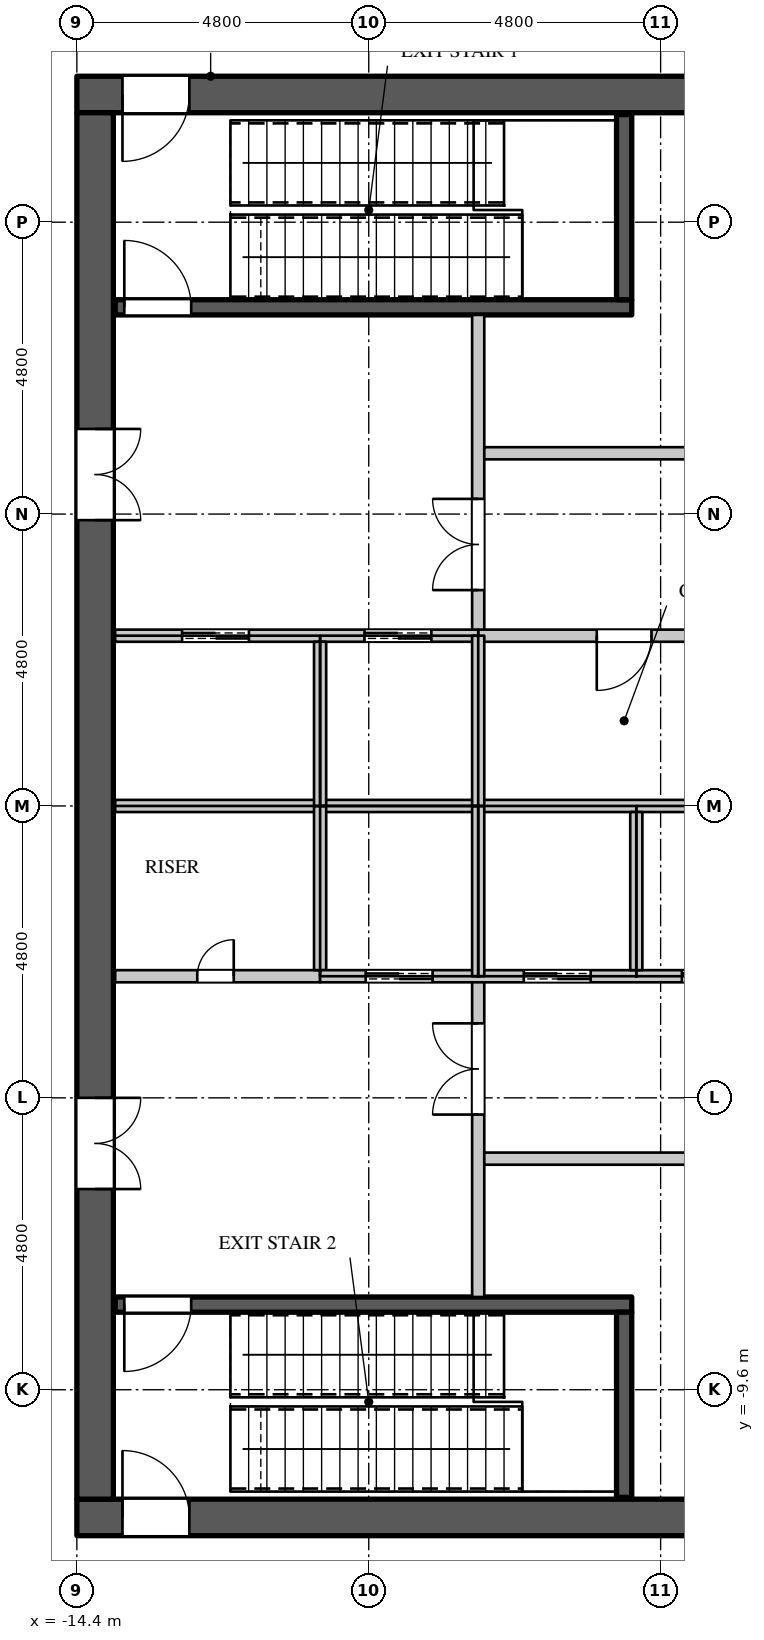
"""IFC4 building model, lengths in metres.
Left out: names, types, materials, properties, quantities, classifications, styles, units other than length and angle.
Written with IfcOpenShell. Run it as: python <this file> out.ifc"""

import sys

from ifc_helpers import new_model, si_unit, direction, frame, frame_2d, origin, place, context, subcontext, project, spatial, rectangle, extrude, element, fill, save


model = new_model("IFC4")
c1 = context("Model", 3, precision=1e-05, world=origin(), true_north=direction((0.0, 1.0)))
c2 = subcontext(c1, "Body", "Model", "MODEL_VIEW")
j1 = project(units=[si_unit("LENGTHUNIT", "METRE"), si_unit("PLANEANGLEUNIT", "RADIAN")], contexts=[c1])
p1 = place(None, origin())
s1 = spatial("IfcSite", under=j1, at=p1, CompositionType="ELEMENT")
p2 = place(p1, origin())
s2 = spatial("IfcBuilding", under=s1, at=p2, CompositionType="ELEMENT")
p3 = place(p2, frame((0.0, 0.0, 314.7)))
s3 = spatial("IfcBuildingStorey", under=s2, at=p3, CompositionType="ELEMENT", Elevation=314.7)
p4 = place(p3, frame((-14.4, 11.7, 0.0), z_axis=(0.0, 0.0, 1.0), x_axis=(1.0, 0.0, 0.0)))
e1 = element("IfcWall", 1, at=p4, inside=s3, PredefinedType="SHEAR", context=c2, shape_type="SweptSolid", body=[
    extrude(rectangle(XDim=28.8, YDim=0.6, at=frame_2d((14.4, 0.0))), origin(), (0.0, 0.0, 1.0), 5.4),
])
p5 = place(p4, frame((0.75, 0.0, 0.0)))
e2 = element("IfcOpeningElement", 2, at=p5, cuts=e1, PredefinedType="OPENING", context=c2, shape_type="SweptSolid", body=[
    extrude(rectangle(XDim=1.1, YDim=2.2, at=frame_2d((0.55, 1.1))), frame((0.0, 0.31, 0.0), z_axis=(0.0, -1.0, 0.0), x_axis=(1.0, 0.0, 0.0)), (0.0, 0.0, 1.0), 0.62),
])
p6 = place(p4, frame((26.95, 0.0, 0.0)))
e3 = element("IfcOpeningElement", 3, at=p6, cuts=e1, PredefinedType="OPENING", context=c2, shape_type="SweptSolid", body=[
    extrude(rectangle(XDim=1.1, YDim=2.2, at=frame_2d((0.55, 1.1))), frame((0.0, 0.31, 0.0), z_axis=(0.0, -1.0, 0.0), x_axis=(1.0, 0.0, 0.0)), (0.0, 0.0, 1.0), 0.62),
])
p7 = place(p3, frame((-14.4, -11.7, 0.0), z_axis=(0.0, 0.0, 1.0), x_axis=(1.0, 0.0, 0.0)))
e4 = element("IfcWall", 4, at=p7, inside=s3, PredefinedType="SHEAR", context=c2, shape_type="SweptSolid", body=[
    extrude(rectangle(XDim=28.8, YDim=0.6, at=frame_2d((14.4, 0.0))), origin(), (0.0, 0.0, 1.0), 5.4),
])
p8 = place(p7, frame((0.75, 0.0, 0.0)))
e5 = element("IfcOpeningElement", 5, at=p8, cuts=e4, PredefinedType="OPENING", context=c2, shape_type="SweptSolid", body=[
    extrude(rectangle(XDim=1.1, YDim=2.2, at=frame_2d((0.55, 1.1))), frame((0.0, 0.31, 0.0), z_axis=(0.0, -1.0, 0.0), x_axis=(1.0, 0.0, 0.0)), (0.0, 0.0, 1.0), 0.62),
])
p9 = place(p7, frame((26.95, 0.0, 0.0)))
e6 = element("IfcOpeningElement", 6, at=p9, cuts=e4, PredefinedType="OPENING", context=c2, shape_type="SweptSolid", body=[
    extrude(rectangle(XDim=1.1, YDim=2.2, at=frame_2d((0.55, 1.1))), frame((0.0, 0.31, 0.0), z_axis=(0.0, -1.0, 0.0), x_axis=(1.0, 0.0, 0.0)), (0.0, 0.0, 1.0), 0.62),
])
p10 = place(p3, frame((-14.1, -11.4, 0.0), z_axis=(0.0, 0.0, 1.0), x_axis=(0.0, 1.0, 0.0)))
e7 = element("IfcWall", 7, at=p10, inside=s3, PredefinedType="SHEAR", context=c2, shape_type="SweptSolid", body=[
    extrude(rectangle(XDim=22.8, YDim=0.6, at=frame_2d((11.4, 0.0))), origin(), (0.0, 0.0, 1.0), 5.4),
])
p11 = place(p10, frame((16.1, 0.0, 0.0)))
e8 = element("IfcOpeningElement", 8, at=p11, cuts=e7, PredefinedType="OPENING", context=c2, shape_type="SweptSolid", body=[
    extrude(rectangle(XDim=1.5, YDim=2.4, at=frame_2d((0.75, 1.2))), frame((0.0, 0.31, 0.0), z_axis=(0.0, -1.0, 0.0), x_axis=(1.0, 0.0, 0.0)), (0.0, 0.0, 1.0), 0.62),
])
p12 = place(p10, frame((5.1, 0.0, 0.0)))
e9 = element("IfcOpeningElement", 9, at=p12, cuts=e7, PredefinedType="OPENING", context=c2, shape_type="SweptSolid", body=[
    extrude(rectangle(XDim=1.5, YDim=2.4, at=frame_2d((0.75, 1.2))), frame((0.0, 0.31, 0.0), z_axis=(0.0, -1.0, 0.0), x_axis=(1.0, 0.0, 0.0)), (0.0, 0.0, 1.0), 0.62),
])
p13 = place(p3, frame((-7.8, -8.075, 0.0), z_axis=(0.0, 0.0, 1.0), x_axis=(0.0, 1.0, 0.0)))
e10 = element("IfcWall", 10, at=p13, inside=s3, PredefinedType="PARTITIONING", context=c2, shape_type="SweptSolid", body=[
    extrude(rectangle(XDim=5.275, YDim=0.2, at=frame_2d((2.637, 0.0))), origin(), (0.0, 0.0, 1.0), 5.1),
])
p14 = place(p13, frame((3.0, 0.0, 0.0)))
e11 = element("IfcOpeningElement", 11, at=p14, cuts=e10, PredefinedType="OPENING", context=c2, shape_type="SweptSolid", body=[
    extrude(rectangle(XDim=1.5, YDim=2.4, at=frame_2d((0.75, 1.2))), frame((0.0, 0.11, 0.0), z_axis=(0.0, -1.0, 0.0), x_axis=(1.0, 0.0, 0.0)), (0.0, 0.0, 1.0), 0.22),
])
p15 = place(p3, frame((-7.7, -5.8, 0.0), z_axis=(0.0, 0.0, 1.0), x_axis=(1.0, 0.0, 0.0)))
e12 = element("IfcWall", 12, at=p15, inside=s3, PredefinedType="PARTITIONING", context=c2, shape_type="SweptSolid", body=[
    extrude(rectangle(XDim=21.47, YDim=0.2, at=frame_2d((10.735, 0.0))), origin(), (0.0, 0.0, 1.0), 5.1),
])
p16 = place(p15, frame((5.35, 0.0, 0.0)))
e13 = element("IfcOpeningElement", 13, at=p16, cuts=e12, PredefinedType="OPENING", context=c2, shape_type="SweptSolid", body=[
    extrude(rectangle(XDim=0.9, YDim=2.2, at=frame_2d((0.45, 1.1))), frame((0.0, 0.11, 0.0), z_axis=(0.0, -1.0, 0.0), x_axis=(1.0, 0.0, 0.0)), (0.0, 0.0, 1.0), 0.22),
])
p17 = place(p15, frame((15.95, 0.0, 0.0)))
e14 = element("IfcOpeningElement", 14, at=p17, cuts=e12, PredefinedType="OPENING", context=c2, shape_type="SweptSolid", body=[
    extrude(rectangle(XDim=0.9, YDim=2.2, at=frame_2d((0.45, 1.1))), frame((0.0, 0.11, 0.0), z_axis=(0.0, -1.0, 0.0), x_axis=(1.0, 0.0, 0.0)), (0.0, 0.0, 1.0), 0.22),
])
p18 = place(p3, frame((-7.8, 2.8, 0.0), z_axis=(0.0, 0.0, 1.0), x_axis=(0.0, 1.0, 0.0)))
e15 = element("IfcWall", 15, at=p18, inside=s3, PredefinedType="PARTITIONING", context=c2, shape_type="SweptSolid", body=[
    extrude(rectangle(XDim=5.275, YDim=0.2, at=frame_2d((2.637, 0.0))), origin(), (0.0, 0.0, 1.0), 5.1),
])
p19 = place(p18, frame((0.75, 0.0, 0.0)))
e16 = element("IfcOpeningElement", 16, at=p19, cuts=e15, PredefinedType="OPENING", context=c2, shape_type="SweptSolid", body=[
    extrude(rectangle(XDim=1.5, YDim=2.4, at=frame_2d((0.75, 1.2))), frame((0.0, 0.11, 0.0), z_axis=(0.0, -1.0, 0.0), x_axis=(1.0, 0.0, 0.0)), (0.0, 0.0, 1.0), 0.22),
])
p20 = place(p3, frame((-7.7, 5.8, 0.0), z_axis=(0.0, 0.0, 1.0), x_axis=(1.0, 0.0, 0.0)))
e17 = element("IfcWall", 17, at=p20, inside=s3, PredefinedType="PARTITIONING", context=c2, shape_type="SweptSolid", body=[
    extrude(rectangle(XDim=8.12, YDim=0.2, at=frame_2d((4.06, 0.0))), origin(), (0.0, 0.0, 1.0), 5.1),
])
p21 = place(p20, frame((3.6, 0.0, 0.0)))
e18 = element("IfcOpeningElement", 18, at=p21, cuts=e17, PredefinedType="OPENING", context=c2, shape_type="SweptSolid", body=[
    extrude(rectangle(XDim=0.9, YDim=2.2, at=frame_2d((0.45, 1.1))), frame((0.0, 0.11, 0.0), z_axis=(0.0, -1.0, 0.0), x_axis=(1.0, 0.0, 0.0)), (0.0, 0.0, 1.0), 0.22),
])
p22 = place(p3, frame((-13.77, -2.8, 0.0), z_axis=(0.0, 0.0, 1.0), x_axis=(1.0, 0.0, 0.0)))
e19 = element("IfcWall", 19, at=p22, inside=s3, PredefinedType="PARTITIONING", context=c2, shape_type="SweptSolid", body=[
    extrude(rectangle(XDim=3.37, YDim=0.2, at=frame_2d((1.685, 0.0))), origin(), (0.0, 0.0, 1.0), 5.1),
])
p23 = place(p22, frame((1.35, 0.0, 0.0)))
e20 = element("IfcOpeningElement", 20, at=p23, cuts=e19, PredefinedType="OPENING", context=c2, shape_type="SweptSolid", body=[
    extrude(rectangle(XDim=0.6, YDim=2.0, at=frame_2d((0.3, 1.0))), frame((0.0, 0.11, 0.0), z_axis=(0.0, -1.0, 0.0), x_axis=(1.0, 0.0, 0.0)), (0.0, 0.0, 1.0), 0.22),
])
p24 = place(p3, frame((-7.8, 2.8, 0.0), z_axis=(0.0, 0.0, 1.0), x_axis=(1.0, 0.0, 0.0)))
e21 = element("IfcWall", 21, at=p24, inside=s3, PredefinedType="PARTITIONING", context=c2, shape_type="SweptSolid", body=[
    extrude(rectangle(XDim=4.82, YDim=0.2, at=frame_2d((2.41, 0.0))), origin(), (0.0, 0.0, 1.0), 5.1),
])
p25 = place(p24, frame((1.95, 0.0, 0.0)))
e22 = element("IfcOpeningElement", 22, at=p25, cuts=e21, PredefinedType="OPENING", context=c2, shape_type="SweptSolid", body=[
    extrude(rectangle(XDim=0.9, YDim=2.2, at=frame_2d((0.45, 1.1))), frame((0.0, 0.11, 0.0), z_axis=(0.0, -1.0, 0.0), x_axis=(1.0, 0.0, 0.0)), (0.0, 0.0, 1.0), 0.22),
])
p26 = place(p3, frame((-13.77, 0.0, 0.0), z_axis=(0.0, 0.0, 1.0), x_axis=(1.0, 0.0, 0.0)))
e23 = element("IfcWall", 23, at=p26, inside=s3, PredefinedType="PARTITIONING", context=c2, shape_type="SweptSolid", body=[
    extrude(rectangle(XDim=21.57, YDim=0.2, at=frame_2d((10.785, 0.0))), origin(), (0.0, 0.0, 1.0), 5.1),
])
p27 = place(p3, frame((-13.77, 2.8, 0.0), z_axis=(0.0, 0.0, 1.0), x_axis=(1.0, 0.0, 0.0)))
e24 = element("IfcWall", 24, at=p27, inside=s3, PredefinedType="PARTITIONING", context=c2, shape_type="SweptSolid", body=[
    extrude(rectangle(XDim=5.97, YDim=0.2, at=frame_2d((2.985, 0.0))), origin(), (0.0, 0.0, 1.0), 5.1),
])
p28 = place(p27, frame((1.1, 0.0, 0.0)))
e25 = element("IfcOpeningElement", 25, at=p28, cuts=e24, PredefinedType="OPENING", context=c2, shape_type="SweptSolid", body=[
    extrude(rectangle(XDim=1.1, YDim=2.2, at=frame_2d((0.55, 1.1))), frame((0.0, 0.11, 0.0), z_axis=(0.0, -1.0, 0.0), x_axis=(1.0, 0.0, 0.0)), (0.0, 0.0, 1.0), 0.22),
])
p29 = place(p27, frame((4.1, 0.0, 0.0)))
e26 = element("IfcOpeningElement", 26, at=p29, cuts=e24, PredefinedType="OPENING", context=c2, shape_type="SweptSolid", body=[
    extrude(rectangle(XDim=1.1, YDim=2.2, at=frame_2d((0.55, 1.1))), frame((0.0, 0.11, 0.0), z_axis=(0.0, -1.0, 0.0), x_axis=(1.0, 0.0, 0.0)), (0.0, 0.0, 1.0), 0.22),
])
p30 = place(p3, frame((-10.4, -2.7, 0.0), z_axis=(0.0, 0.0, 1.0), x_axis=(0.0, 1.0, 0.0)))
e27 = element("IfcWall", 27, at=p30, inside=s3, PredefinedType="PARTITIONING", context=c2, shape_type="SweptSolid", body=[
    extrude(rectangle(XDim=2.7, YDim=0.2, at=frame_2d((1.35, 0.0))), origin(), (0.0, 0.0, 1.0), 5.1),
])
p31 = place(p3, frame((-10.4, -2.8, 0.0), z_axis=(0.0, 0.0, 1.0), x_axis=(1.0, 0.0, 0.0)))
e28 = element("IfcWall", 28, at=p31, inside=s3, PredefinedType="PARTITIONING", context=c2, shape_type="SweptSolid", body=[
    extrude(rectangle(XDim=18.2, YDim=0.2, at=frame_2d((9.1, 0.0))), origin(), (0.0, 0.0, 1.0), 5.1),
])
p32 = place(p31, frame((0.75, 0.0, 0.0)))
e29 = element("IfcOpeningElement", 29, at=p32, cuts=e28, PredefinedType="OPENING", context=c2, shape_type="SweptSolid", body=[
    extrude(rectangle(XDim=1.1, YDim=2.2, at=frame_2d((0.55, 1.1))), frame((0.0, 0.11, 0.0), z_axis=(0.0, -1.0, 0.0), x_axis=(1.0, 0.0, 0.0)), (0.0, 0.0, 1.0), 0.22),
])
p33 = place(p31, frame((3.35, 0.0, 0.0)))
e30 = element("IfcOpeningElement", 30, at=p33, cuts=e28, PredefinedType="OPENING", context=c2, shape_type="SweptSolid", body=[
    extrude(rectangle(XDim=1.1, YDim=2.2, at=frame_2d((0.55, 1.1))), frame((0.0, 0.11, 0.0), z_axis=(0.0, -1.0, 0.0), x_axis=(1.0, 0.0, 0.0)), (0.0, 0.0, 1.0), 0.22),
])
p34 = place(p31, frame((5.95, 0.0, 0.0)))
e31 = element("IfcOpeningElement", 31, at=p34, cuts=e28, PredefinedType="OPENING", context=c2, shape_type="SweptSolid", body=[
    extrude(rectangle(XDim=1.1, YDim=2.2, at=frame_2d((0.55, 1.1))), frame((0.0, 0.11, 0.0), z_axis=(0.0, -1.0, 0.0), x_axis=(1.0, 0.0, 0.0)), (0.0, 0.0, 1.0), 0.22),
])
p35 = place(p31, frame((8.55, 0.0, 0.0)))
e32 = element("IfcOpeningElement", 32, at=p35, cuts=e28, PredefinedType="OPENING", context=c2, shape_type="SweptSolid", body=[
    extrude(rectangle(XDim=1.1, YDim=2.2, at=frame_2d((0.55, 1.1))), frame((0.0, 0.11, 0.0), z_axis=(0.0, -1.0, 0.0), x_axis=(1.0, 0.0, 0.0)), (0.0, 0.0, 1.0), 0.22),
])
p36 = place(p31, frame((11.15, 0.0, 0.0)))
e33 = element("IfcOpeningElement", 33, at=p36, cuts=e28, PredefinedType="OPENING", context=c2, shape_type="SweptSolid", body=[
    extrude(rectangle(XDim=1.1, YDim=2.2, at=frame_2d((0.55, 1.1))), frame((0.0, 0.11, 0.0), z_axis=(0.0, -1.0, 0.0), x_axis=(1.0, 0.0, 0.0)), (0.0, 0.0, 1.0), 0.22),
])
p37 = place(p31, frame((13.75, 0.0, 0.0)))
e34 = element("IfcOpeningElement", 34, at=p37, cuts=e28, PredefinedType="OPENING", context=c2, shape_type="SweptSolid", body=[
    extrude(rectangle(XDim=1.1, YDim=2.2, at=frame_2d((0.55, 1.1))), frame((0.0, 0.11, 0.0), z_axis=(0.0, -1.0, 0.0), x_axis=(1.0, 0.0, 0.0)), (0.0, 0.0, 1.0), 0.22),
])
p38 = place(p31, frame((16.35, 0.0, 0.0)))
e35 = element("IfcOpeningElement", 35, at=p38, cuts=e28, PredefinedType="OPENING", context=c2, shape_type="SweptSolid", body=[
    extrude(rectangle(XDim=1.1, YDim=2.2, at=frame_2d((0.55, 1.1))), frame((0.0, 0.11, 0.0), z_axis=(0.0, -1.0, 0.0), x_axis=(1.0, 0.0, 0.0)), (0.0, 0.0, 1.0), 0.22),
])
p39 = place(p3, frame((-10.4, 0.0, 0.0), z_axis=(0.0, 0.0, 1.0), x_axis=(0.0, 1.0, 0.0)))
e36 = element("IfcWall", 36, at=p39, inside=s3, PredefinedType="PARTITIONING", context=c2, shape_type="SweptSolid", body=[
    extrude(rectangle(XDim=2.7, YDim=0.2, at=frame_2d((1.35, 0.0))), origin(), (0.0, 0.0, 1.0), 5.1),
])
for number, where, z_axis, x_axis in (
    (37, (-7.8, -2.8, 0.0), (0.0, 0.0, 1.0), (0.0, 1.0, 0.0)),
    (38, (-7.8, 0.0, 0.0), (0.0, 0.0, 1.0), (0.0, 1.0, 0.0)),
):
    element("IfcWall", number, at=place(p3, frame(where, z_axis=z_axis, x_axis=x_axis)), inside=s3, PredefinedType="PARTITIONING", context=c2, shape_type="SweptSolid", body=[
        extrude(rectangle(XDim=2.8, YDim=0.2, at=frame_2d((1.4, 0.0))), origin(), (0.0, 0.0, 1.0), 5.1),
    ])
p40 = place(p3, frame((-5.2, -2.7, 0.0), z_axis=(0.0, 0.0, 1.0), x_axis=(0.0, 1.0, 0.0)))
e39 = element("IfcWall", 39, at=p40, inside=s3, PredefinedType="PARTITIONING", context=c2, shape_type="SweptSolid", body=[
    extrude(rectangle(XDim=2.6, YDim=0.2, at=frame_2d((1.3, 0.0))), origin(), (0.0, 0.0, 1.0), 5.1),
])
p41 = place(p3, frame((-13.77, -8.2, 0.0), z_axis=(0.0, 0.0, 1.0), x_axis=(1.0, 0.0, 0.0)))
e40 = element("IfcWall", 40, at=p41, inside=s3, PredefinedType="SHEAR", context=c2, shape_type="SweptSolid", body=[
    extrude(rectangle(XDim=8.495, YDim=0.25, at=frame_2d((4.248, 0.0))), origin(), (0.0, 0.0, 1.0), 5.1),
])
p42 = place(p41, frame((0.15, 0.0, 0.0)))
e41 = element("IfcOpeningElement", 41, at=p42, cuts=e40, PredefinedType="OPENING", context=c2, shape_type="SweptSolid", body=[
    extrude(rectangle(XDim=1.1, YDim=2.2, at=frame_2d((0.55, 1.1))), frame((0.0, 0.135, 0.0), z_axis=(0.0, -1.0, 0.0), x_axis=(1.0, 0.0, 0.0)), (0.0, 0.0, 1.0), 0.27),
])
p43 = place(p3, frame((-13.77, 8.2, 0.0), z_axis=(0.0, 0.0, 1.0), x_axis=(1.0, 0.0, 0.0)))
e42 = element("IfcWall", 42, at=p43, inside=s3, PredefinedType="SHEAR", context=c2, shape_type="SweptSolid", body=[
    extrude(rectangle(XDim=8.495, YDim=0.25, at=frame_2d((4.248, 0.0))), origin(), (0.0, 0.0, 1.0), 5.1),
])
p44 = place(p43, frame((0.15, 0.0, 0.0)))
e43 = element("IfcOpeningElement", 43, at=p44, cuts=e42, PredefinedType="OPENING", context=c2, shape_type="SweptSolid", body=[
    extrude(rectangle(XDim=1.1, YDim=2.2, at=frame_2d((0.55, 1.1))), frame((0.0, 0.135, 0.0), z_axis=(0.0, -1.0, 0.0), x_axis=(1.0, 0.0, 0.0)), (0.0, 0.0, 1.0), 0.27),
])
for number, where, z_axis, x_axis in (
    (44, (-5.4, -11.37, 0.0), (0.0, 0.0, 1.0), (0.0, 1.0, 0.0)),
    (45, (-5.4, 8.325, 0.0), (0.0, 0.0, 1.0), (0.0, 1.0, 0.0)),
):
    element("IfcWall", number, at=place(p3, frame(where, z_axis=z_axis, x_axis=x_axis)), inside=s3, PredefinedType="SHEAR", context=c2, shape_type="SweptSolid", body=[
        extrude(rectangle(XDim=3.045, YDim=0.25, at=frame_2d((1.522, 0.0))), origin(), (0.0, 0.0, 1.0), 5.1),
    ])
p45 = place(p23, origin())
e46 = element("IfcDoor", 46, at=p45, inside=s3, OperationType="SINGLE_SWING_RIGHT", PredefinedType="DOOR", context=c2, shape_type="SweptSolid", body=[
    extrude(rectangle(XDim=0.6, YDim=2.0, at=frame_2d((0.3, 1.0))), frame((0.0, 0.025, 0.0), z_axis=(0.0, -1.0, 0.0), x_axis=(1.0, 0.0, 0.0)), (0.0, 0.0, 1.0), 0.05),
])
fill(e20, e46)
p46 = place(p25, origin())
e47 = element("IfcDoor", 47, at=p46, inside=s3, OperationType="SINGLE_SWING_RIGHT", PredefinedType="DOOR", context=c2, shape_type="SweptSolid", body=[
    extrude(rectangle(XDim=0.9, YDim=2.2, at=frame_2d((0.45, 1.1))), frame((0.0, 0.025, 0.0), z_axis=(0.0, -1.0, 0.0), x_axis=(1.0, 0.0, 0.0)), (0.0, 0.0, 1.0), 0.05),
])
fill(e22, e47)
p47 = place(p28, origin())
e48 = element("IfcDoor", 48, at=p47, inside=s3, OperationType="DOUBLE_DOOR_SLIDING", PredefinedType="DOOR", context=c2, shape_type="SweptSolid", body=[
    extrude(rectangle(XDim=1.1, YDim=2.2, at=frame_2d((0.55, 1.1))), frame((0.0, 0.025, 0.0), z_axis=(0.0, -1.0, 0.0), x_axis=(1.0, 0.0, 0.0)), (0.0, 0.0, 1.0), 0.05),
])
fill(e25, e48)
p48 = place(p29, origin())
e49 = element("IfcDoor", 49, at=p48, inside=s3, OperationType="DOUBLE_DOOR_SLIDING", PredefinedType="DOOR", context=c2, shape_type="SweptSolid", body=[
    extrude(rectangle(XDim=1.1, YDim=2.2, at=frame_2d((0.55, 1.1))), frame((0.0, 0.025, 0.0), z_axis=(0.0, -1.0, 0.0), x_axis=(1.0, 0.0, 0.0)), (0.0, 0.0, 1.0), 0.05),
])
fill(e26, e49)
p49 = place(p32, origin())
e50 = element("IfcDoor", 50, at=p49, inside=s3, OperationType="DOUBLE_DOOR_SLIDING", PredefinedType="DOOR", context=c2, shape_type="SweptSolid", body=[
    extrude(rectangle(XDim=1.1, YDim=2.2, at=frame_2d((0.55, 1.1))), frame((0.0, 0.025, 0.0), z_axis=(0.0, -1.0, 0.0), x_axis=(1.0, 0.0, 0.0)), (0.0, 0.0, 1.0), 0.05),
])
fill(e29, e50)
p50 = place(p33, origin())
e51 = element("IfcDoor", 51, at=p50, inside=s3, OperationType="DOUBLE_DOOR_SLIDING", PredefinedType="DOOR", context=c2, shape_type="SweptSolid", body=[
    extrude(rectangle(XDim=1.1, YDim=2.2, at=frame_2d((0.55, 1.1))), frame((0.0, 0.025, 0.0), z_axis=(0.0, -1.0, 0.0), x_axis=(1.0, 0.0, 0.0)), (0.0, 0.0, 1.0), 0.05),
])
fill(e30, e51)
p51 = place(p34, origin())
e52 = element("IfcDoor", 52, at=p51, inside=s3, OperationType="DOUBLE_DOOR_SLIDING", PredefinedType="DOOR", context=c2, shape_type="SweptSolid", body=[
    extrude(rectangle(XDim=1.1, YDim=2.2, at=frame_2d((0.55, 1.1))), frame((0.0, 0.025, 0.0), z_axis=(0.0, -1.0, 0.0), x_axis=(1.0, 0.0, 0.0)), (0.0, 0.0, 1.0), 0.05),
])
fill(e31, e52)
p52 = place(p44, origin())
e53 = element("IfcDoor", 53, at=p52, inside=s3, OperationType="SINGLE_SWING_LEFT", PredefinedType="DOOR", context=c2, shape_type="SweptSolid", body=[
    extrude(rectangle(XDim=1.1, YDim=2.2, at=frame_2d((0.55, 1.1))), frame((0.0, 0.025, 0.0), z_axis=(0.0, -1.0, 0.0), x_axis=(1.0, 0.0, 0.0)), (0.0, 0.0, 1.0), 0.05),
])
fill(e43, e53)
p53 = place(p42, origin())
e54 = element("IfcDoor", 54, at=p53, inside=s3, OperationType="SINGLE_SWING_RIGHT", PredefinedType="DOOR", context=c2, shape_type="SweptSolid", body=[
    extrude(rectangle(XDim=1.1, YDim=2.2, at=frame_2d((0.55, 1.1))), frame((0.0, 0.025, 0.0), z_axis=(0.0, -1.0, 0.0), x_axis=(1.0, 0.0, 0.0)), (0.0, 0.0, 1.0), 0.05),
])
fill(e41, e54)
p54 = place(p19, origin())
e55 = element("IfcDoor", 55, at=p54, inside=s3, OperationType="DOUBLE_DOOR_SINGLE_SWING", PredefinedType="DOOR", context=c2, shape_type="SweptSolid", body=[
    extrude(rectangle(XDim=1.5, YDim=2.4, at=frame_2d((0.75, 1.2))), frame((0.0, 0.025, 0.0), z_axis=(0.0, -1.0, 0.0), x_axis=(1.0, 0.0, 0.0)), (0.0, 0.0, 1.0), 0.05),
])
fill(e16, e55)
p55 = place(p14, origin())
e56 = element("IfcDoor", 56, at=p55, inside=s3, OperationType="DOUBLE_DOOR_SINGLE_SWING", PredefinedType="DOOR", context=c2, shape_type="SweptSolid", body=[
    extrude(rectangle(XDim=1.5, YDim=2.4, at=frame_2d((0.75, 1.2))), frame((0.0, 0.025, 0.0), z_axis=(0.0, -1.0, 0.0), x_axis=(1.0, 0.0, 0.0)), (0.0, 0.0, 1.0), 0.05),
])
fill(e11, e56)
p56 = place(p11, origin())
e57 = element("IfcDoor", 57, at=p56, inside=s3, OperationType="DOUBLE_DOOR_SINGLE_SWING", PredefinedType="DOOR", context=c2, shape_type="SweptSolid", body=[
    extrude(rectangle(XDim=1.5, YDim=2.4, at=frame_2d((0.75, 1.2))), frame((0.0, -0.245, 0.0), z_axis=(0.0, -1.0, 0.0), x_axis=(1.0, 0.0, 0.0)), (0.0, 0.0, 1.0), 0.05),
])
fill(e8, e57)
p57 = place(p12, origin())
e58 = element("IfcDoor", 58, at=p57, inside=s3, OperationType="DOUBLE_DOOR_SINGLE_SWING", PredefinedType="DOOR", context=c2, shape_type="SweptSolid", body=[
    extrude(rectangle(XDim=1.5, YDim=2.4, at=frame_2d((0.75, 1.2))), frame((0.0, -0.245, 0.0), z_axis=(0.0, -1.0, 0.0), x_axis=(1.0, 0.0, 0.0)), (0.0, 0.0, 1.0), 0.05),
])
fill(e9, e58)
p58 = place(p5, origin())
e59 = element("IfcDoor", 59, at=p58, inside=s3, OperationType="SINGLE_SWING_RIGHT", PredefinedType="DOOR", context=c2, shape_type="SweptSolid", body=[
    extrude(rectangle(XDim=1.1, YDim=2.2, at=frame_2d((0.55, 1.1))), frame((0.0, -0.245, 0.0), z_axis=(0.0, -1.0, 0.0), x_axis=(1.0, 0.0, 0.0)), (0.0, 0.0, 1.0), 0.05),
])
fill(e2, e59)
p59 = place(p8, origin())
e60 = element("IfcDoor", 60, at=p59, inside=s3, OperationType="SINGLE_SWING_LEFT", PredefinedType="DOOR", context=c2, shape_type="SweptSolid", body=[
    extrude(rectangle(XDim=1.1, YDim=2.2, at=frame_2d((0.55, 1.1))), frame((0.0, 0.295, 0.0), z_axis=(0.0, -1.0, 0.0), x_axis=(1.0, 0.0, 0.0)), (0.0, 0.0, 1.0), 0.05),
])
fill(e5, e60)
save(model, sys.argv[1])
